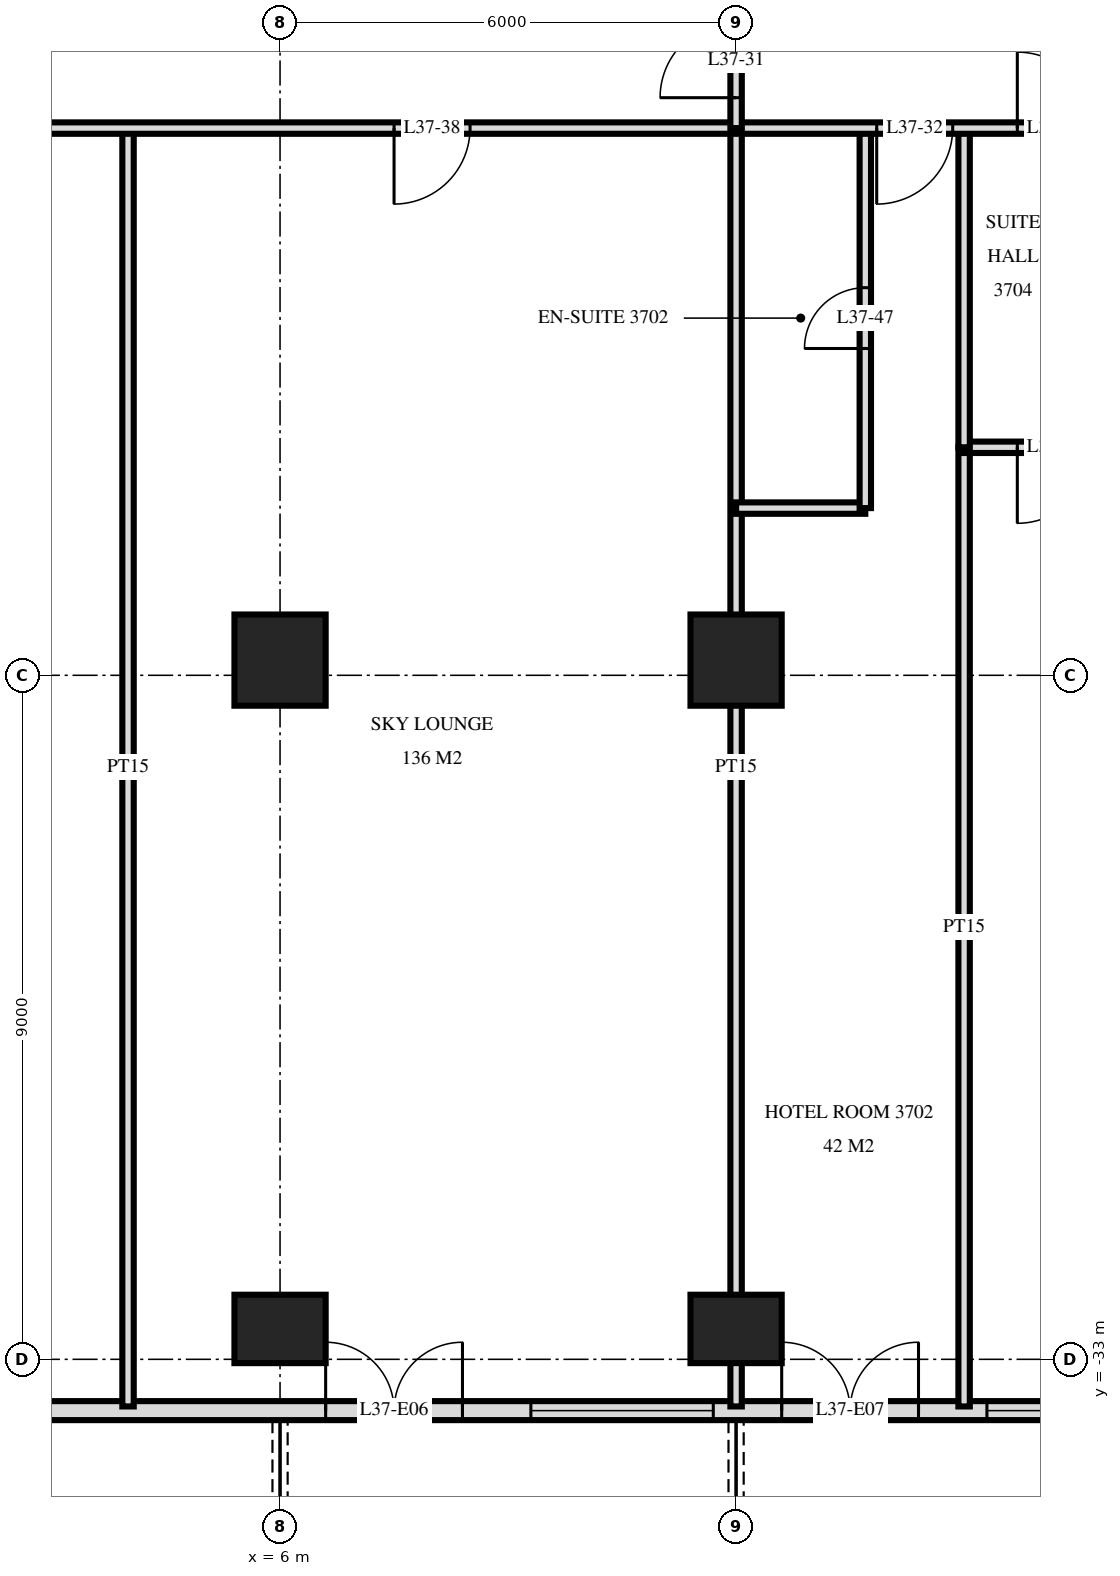
"""IFC4 building model, lengths in metres.
Left out: names, types, materials, properties, quantities, classifications, styles, units other than length and angle.
Written with IfcOpenShell. Run it as: python <this file> out.ifc"""

import sys

from ifc_helpers import new_model, si_unit, direction, frame, frame_2d, origin, origin_2d, place, context, subcontext, project, spatial, rectangle, extrude, element, fill, save


model = new_model("IFC4")
c1 = context("Model", 3, precision=1e-05, world=origin(), true_north=direction((0.0, 1.0)))
c2 = subcontext(c1, "Body", "Model", "MODEL_VIEW")
j1 = project(units=[si_unit("LENGTHUNIT", "METRE"), si_unit("PLANEANGLEUNIT", "RADIAN")], contexts=[c1])
p1 = place(None, origin())
s1 = spatial("IfcSite", under=j1, at=p1, CompositionType="ELEMENT")
p2 = place(p1, origin())
s2 = spatial("IfcBuilding", under=s1, at=p2, CompositionType="ELEMENT")
p3 = place(p2, frame((0.0, 0.0, 145.2)))
s3 = spatial("IfcBuildingStorey", under=s2, at=p3, CompositionType="ELEMENT", Elevation=145.2)
p4 = place(p3, frame((6.0, -32.6, 0.0), z_axis=(0.0, 0.0, 1.0), x_axis=(1.0, 0.0, 0.0)))
e1 = element("IfcColumn", 1, at=p4, inside=s3, PredefinedType="COLUMN", context=c2, shape_type="SweptSolid", body=[
    extrude(rectangle(XDim=1.2, YDim=0.9, at=origin_2d()), origin(), (0.0, 0.0, 1.0), 3.6),
])
p5 = place(p3, frame((6.0, -23.8, 0.0), z_axis=(0.0, 0.0, 1.0), x_axis=(1.0, 0.0, 0.0)))
e2 = element("IfcColumn", 2, at=p5, inside=s3, PredefinedType="COLUMN", context=c2, shape_type="SweptSolid", body=[
    extrude(rectangle(XDim=1.2, YDim=1.2, at=origin_2d()), origin(), (0.0, 0.0, 1.0), 3.6),
])
p6 = place(p3, frame((12.0, -32.6, 0.0), z_axis=(0.0, 0.0, 1.0), x_axis=(1.0, 0.0, 0.0)))
e3 = element("IfcColumn", 3, at=p6, inside=s3, PredefinedType="COLUMN", context=c2, shape_type="SweptSolid", body=[
    extrude(rectangle(XDim=1.2, YDim=0.9, at=origin_2d()), origin(), (0.0, 0.0, 1.0), 3.6),
])
p7 = place(p3, frame((12.0, -23.8, 0.0), z_axis=(0.0, 0.0, 1.0), x_axis=(1.0, 0.0, 0.0)))
e4 = element("IfcColumn", 4, at=p7, inside=s3, PredefinedType="COLUMN", context=c2, shape_type="SweptSolid", body=[
    extrude(rectangle(XDim=1.2, YDim=1.2, at=origin_2d()), origin(), (0.0, 0.0, 1.0), 3.6),
])
p8 = place(p3, frame((-23.675, -33.675, 0.0), z_axis=(0.0, 0.0, 1.0), x_axis=(1.0, 0.0, 0.0)))
e5 = element("IfcWall", 5, at=p8, inside=s3, PredefinedType="SOLIDWALL", context=c2, shape_type="SweptSolid", body=[
    extrude(rectangle(XDim=47.351, YDim=0.25, at=frame_2d((23.675, 0.0))), origin(), (0.0, 0.0, 1.0), 3.32),
])
p9 = place(p8, frame((3.425, 0.0, 0.0)))
e6 = element("IfcOpeningElement", 6, at=p9, cuts=e5, PredefinedType="OPENING", context=c2, shape_type="SweptSolid", body=[
    extrude(rectangle(XDim=1.8, YDim=2.4, at=frame_2d((0.9, 1.2))), frame((0.0, 0.135, 0.0), z_axis=(0.0, -1.0, 0.0), x_axis=(1.0, 0.0, 0.0)), (0.0, 0.0, 1.0), 0.27),
])
p10 = place(p8, frame((6.275, 0.0, 0.0)))
e7 = element("IfcOpeningElement", 7, at=p10, cuts=e5, PredefinedType="OPENING", context=c2, shape_type="SweptSolid", body=[
    extrude(rectangle(XDim=1.8, YDim=2.4, at=frame_2d((0.9, 1.2))), frame((0.0, 0.135, 0.0), z_axis=(0.0, -1.0, 0.0), x_axis=(1.0, 0.0, 0.0)), (0.0, 0.0, 1.0), 0.27),
])
p11 = place(p8, frame((8.975, 0.0, 0.3)))
e8 = element("IfcOpeningElement", 8, at=p11, cuts=e5, PredefinedType="OPENING", context=c2, shape_type="SweptSolid", body=[
    extrude(rectangle(XDim=2.4, YDim=2.1, at=frame_2d((1.2, 1.05))), frame((0.0, 0.135, 0.0), z_axis=(0.0, -1.0, 0.0), x_axis=(1.0, 0.0, 0.0)), (0.0, 0.0, 1.0), 0.27),
])
p12 = place(p8, frame((12.275, 0.0, 0.0)))
e9 = element("IfcOpeningElement", 9, at=p12, cuts=e5, PredefinedType="OPENING", context=c2, shape_type="SweptSolid", body=[
    extrude(rectangle(XDim=1.8, YDim=2.4, at=frame_2d((0.9, 1.2))), frame((0.0, 0.135, 0.0), z_axis=(0.0, -1.0, 0.0), x_axis=(1.0, 0.0, 0.0)), (0.0, 0.0, 1.0), 0.27),
])
p13 = place(p8, frame((14.975, 0.0, 0.3)))
e10 = element("IfcOpeningElement", 10, at=p13, cuts=e5, PredefinedType="OPENING", context=c2, shape_type="SweptSolid", body=[
    extrude(rectangle(XDim=2.4, YDim=2.1, at=frame_2d((1.2, 1.05))), frame((0.0, 0.135, 0.0), z_axis=(0.0, -1.0, 0.0), x_axis=(1.0, 0.0, 0.0)), (0.0, 0.0, 1.0), 0.27),
])
p14 = place(p8, frame((21.275, 0.0, 0.0)))
e11 = element("IfcOpeningElement", 11, at=p14, cuts=e5, PredefinedType="OPENING", context=c2, shape_type="SweptSolid", body=[
    extrude(rectangle(XDim=1.8, YDim=2.4, at=frame_2d((0.9, 1.2))), frame((0.0, 0.135, 0.0), z_axis=(0.0, -1.0, 0.0), x_axis=(1.0, 0.0, 0.0)), (0.0, 0.0, 1.0), 0.27),
])
p15 = place(p8, frame((24.275, 0.0, 0.0)))
e12 = element("IfcOpeningElement", 12, at=p15, cuts=e5, PredefinedType="OPENING", context=c2, shape_type="SweptSolid", body=[
    extrude(rectangle(XDim=1.8, YDim=2.4, at=frame_2d((0.9, 1.2))), frame((0.0, 0.135, 0.0), z_axis=(0.0, -1.0, 0.0), x_axis=(1.0, 0.0, 0.0)), (0.0, 0.0, 1.0), 0.27),
])
p16 = place(p8, frame((30.275, 0.0, 0.0)))
e13 = element("IfcOpeningElement", 13, at=p16, cuts=e5, PredefinedType="OPENING", context=c2, shape_type="SweptSolid", body=[
    extrude(rectangle(XDim=1.8, YDim=2.4, at=frame_2d((0.9, 1.2))), frame((0.0, 0.135, 0.0), z_axis=(0.0, -1.0, 0.0), x_axis=(1.0, 0.0, 0.0)), (0.0, 0.0, 1.0), 0.27),
])
p17 = place(p8, frame((32.975, 0.0, 0.3)))
e14 = element("IfcOpeningElement", 14, at=p17, cuts=e5, PredefinedType="OPENING", context=c2, shape_type="SweptSolid", body=[
    extrude(rectangle(XDim=2.4, YDim=2.1, at=frame_2d((1.2, 1.05))), frame((0.0, 0.135, 0.0), z_axis=(0.0, -1.0, 0.0), x_axis=(1.0, 0.0, 0.0)), (0.0, 0.0, 1.0), 0.27),
])
p18 = place(p8, frame((36.275, 0.0, 0.0)))
e15 = element("IfcOpeningElement", 15, at=p18, cuts=e5, PredefinedType="OPENING", context=c2, shape_type="SweptSolid", body=[
    extrude(rectangle(XDim=1.8, YDim=2.4, at=frame_2d((0.9, 1.2))), frame((0.0, 0.135, 0.0), z_axis=(0.0, -1.0, 0.0), x_axis=(1.0, 0.0, 0.0)), (0.0, 0.0, 1.0), 0.27),
])
p19 = place(p8, frame((38.975, 0.0, 0.3)))
e16 = element("IfcOpeningElement", 16, at=p19, cuts=e5, PredefinedType="OPENING", context=c2, shape_type="SweptSolid", body=[
    extrude(rectangle(XDim=2.4, YDim=2.1, at=frame_2d((1.2, 1.05))), frame((0.0, 0.135, 0.0), z_axis=(0.0, -1.0, 0.0), x_axis=(1.0, 0.0, 0.0)), (0.0, 0.0, 1.0), 0.27),
])
p20 = place(p8, frame((42.275, 0.0, 0.0)))
e17 = element("IfcOpeningElement", 17, at=p20, cuts=e5, PredefinedType="OPENING", context=c2, shape_type="SweptSolid", body=[
    extrude(rectangle(XDim=1.8, YDim=2.4, at=frame_2d((0.9, 1.2))), frame((0.0, 0.135, 0.0), z_axis=(0.0, -1.0, 0.0), x_axis=(1.0, 0.0, 0.0)), (0.0, 0.0, 1.0), 0.27),
])
p21 = place(p8, frame((45.125, 0.0, 0.3)))
e18 = element("IfcOpeningElement", 18, at=p21, cuts=e5, PredefinedType="OPENING", context=c2, shape_type="SweptSolid", body=[
    extrude(rectangle(XDim=1.8, YDim=2.1, at=frame_2d((0.9, 1.05))), frame((0.0, 0.135, 0.0), z_axis=(0.0, -1.0, 0.0), x_axis=(1.0, 0.0, 0.0)), (0.0, 0.0, 1.0), 0.27),
])
p22 = place(p3, frame((15.0, -21.0, 0.0), z_axis=(0.0, 0.0, 1.0), x_axis=(0.0, 1.0, 0.0)))
e19 = element("IfcWall", 19, at=p22, inside=s3, PredefinedType="PARTITIONING", context=c2, shape_type="SweptSolid", body=[
    extrude(rectangle(XDim=4.2, YDim=0.15, at=frame_2d((2.1, 0.0))), origin(), (0.0, 0.0, 1.0), 3.32),
])
p23 = place(p3, frame((15.0, -33.62, 0.0), z_axis=(0.0, 0.0, 1.0), x_axis=(0.0, 1.0, 0.0)))
e20 = element("IfcWall", 20, at=p23, inside=s3, PredefinedType="PARTITIONING", context=c2, shape_type="SweptSolid", body=[
    extrude(rectangle(XDim=12.62, YDim=0.15, at=frame_2d((6.31, 0.0))), origin(), (0.0, 0.0, 1.0), 3.32),
])
p24 = place(p3, frame((13.7, -21.8, 0.0), z_axis=(0.0, 0.0, 1.0), x_axis=(0.0, 1.0, 0.0)))
e21 = element("IfcWall", 21, at=p24, inside=s3, PredefinedType="PARTITIONING", context=c2, shape_type="SweptSolid", body=[
    extrude(rectangle(XDim=5.0, YDim=0.15, at=frame_2d((2.5, 0.0))), origin(), (0.0, 0.0, 1.0), 3.32),
])
p25 = place(p24, frame((2.1, 0.0, 0.0)))
e22 = element("IfcOpeningElement", 22, at=p25, cuts=e21, PredefinedType="OPENING", context=c2, shape_type="SweptSolid", body=[
    extrude(rectangle(XDim=0.8, YDim=2.1, at=frame_2d((0.4, 1.05))), frame((0.0, 0.085, 0.0), z_axis=(0.0, -1.0, 0.0), x_axis=(1.0, 0.0, 0.0)), (0.0, 0.0, 1.0), 0.17),
])
p26 = place(p3, frame((12.0, -16.8, 0.0), z_axis=(0.0, 0.0, 1.0), x_axis=(0.0, 1.0, 0.0)))
e23 = element("IfcWall", 23, at=p26, inside=s3, PredefinedType="PARTITIONING", context=c2, shape_type="SweptSolid", body=[
    extrude(rectangle(XDim=1.75, YDim=0.15, at=frame_2d((0.875, 0.0))), origin(), (0.0, 0.0, 1.0), 3.32),
])
p27 = place(p26, frame((0.4, 0.0, 0.0)))
e24 = element("IfcOpeningElement", 24, at=p27, cuts=e23, PredefinedType="OPENING", context=c2, shape_type="SweptSolid", body=[
    extrude(rectangle(XDim=1.0, YDim=2.1, at=frame_2d((0.5, 1.05))), frame((0.0, 0.085, 0.0), z_axis=(0.0, -1.0, 0.0), x_axis=(1.0, 0.0, 0.0)), (0.0, 0.0, 1.0), 0.17),
])
for number, where, z_axis, x_axis in (
    (25, (12.0, -33.62, 0.0), (0.0, 0.0, 1.0), (0.0, 1.0, 0.0)),
    (26, (4.0, -33.62, 0.0), (0.0, 0.0, 1.0), (0.0, 1.0, 0.0)),
):
    element("IfcWall", number, at=place(p3, frame(where, z_axis=z_axis, x_axis=x_axis)), inside=s3, PredefinedType="PARTITIONING", context=c2, shape_type="SweptSolid", body=[
        extrude(rectangle(XDim=16.82, YDim=0.15, at=frame_2d((8.41, 0.0))), origin(), (0.0, 0.0, 1.0), 3.32),
    ])
p28 = place(p3, frame((12.0, -21.8, 0.0), z_axis=(0.0, 0.0, 1.0), x_axis=(1.0, 0.0, 0.0)))
e27 = element("IfcWall", 27, at=p28, inside=s3, PredefinedType="PARTITIONING", context=c2, shape_type="SweptSolid", body=[
    extrude(rectangle(XDim=1.7, YDim=0.15, at=frame_2d((0.85, 0.0))), origin(), (0.0, 0.0, 1.0), 3.32),
])
p29 = place(p3, frame((15.0, -21.0, 0.0), z_axis=(0.0, 0.0, 1.0), x_axis=(1.0, 0.0, 0.0)))
e28 = element("IfcWall", 28, at=p29, inside=s3, PredefinedType="PARTITIONING", context=c2, shape_type="SweptSolid", body=[
    extrude(rectangle(XDim=2.4, YDim=0.15, at=frame_2d((1.2, 0.0))), origin(), (0.0, 0.0, 1.0), 3.32),
])
p30 = place(p29, frame((0.7, 0.0, 0.0)))
e29 = element("IfcOpeningElement", 29, at=p30, cuts=e28, PredefinedType="OPENING", context=c2, shape_type="SweptSolid", body=[
    extrude(rectangle(XDim=1.0, YDim=2.1, at=frame_2d((0.5, 1.05))), frame((0.0, 0.085, 0.0), z_axis=(0.0, -1.0, 0.0), x_axis=(1.0, 0.0, 0.0)), (0.0, 0.0, 1.0), 0.17),
])
p31 = place(p3, frame((-28.02, -16.8, 0.0), z_axis=(0.0, 0.0, 1.0), x_axis=(1.0, 0.0, 0.0)))
e30 = element("IfcWall", 30, at=p31, inside=s3, PredefinedType="PARTITIONING", context=c2, shape_type="SweptSolid", body=[
    extrude(rectangle(XDim=56.04, YDim=0.15, at=frame_2d((28.02, 0.0))), origin(), (0.0, 0.0, 1.0), 3.32),
])
p32 = place(p31, frame((13.17, 0.0, 0.0)))
e31 = element("IfcOpeningElement", 31, at=p32, cuts=e30, PredefinedType="OPENING", context=c2, shape_type="SweptSolid", body=[
    extrude(rectangle(XDim=1.0, YDim=2.1, at=frame_2d((0.5, 1.05))), frame((0.0, 0.085, 0.0), z_axis=(0.0, -1.0, 0.0), x_axis=(1.0, 0.0, 0.0)), (0.0, 0.0, 1.0), 0.17),
])
p33 = place(p31, frame((11.32, 0.0, 0.0)))
e32 = element("IfcOpeningElement", 32, at=p33, cuts=e30, PredefinedType="OPENING", context=c2, shape_type="SweptSolid", body=[
    extrude(rectangle(XDim=1.0, YDim=2.1, at=frame_2d((0.5, 1.05))), frame((0.0, 0.085, 0.0), z_axis=(0.0, -1.0, 0.0), x_axis=(1.0, 0.0, 0.0)), (0.0, 0.0, 1.0), 0.17),
])
p34 = place(p31, frame((41.87, 0.0, 0.0)))
e33 = element("IfcOpeningElement", 33, at=p34, cuts=e30, PredefinedType="OPENING", context=c2, shape_type="SweptSolid", body=[
    extrude(rectangle(XDim=1.0, YDim=2.1, at=frame_2d((0.5, 1.05))), frame((0.0, 0.085, 0.0), z_axis=(0.0, -1.0, 0.0), x_axis=(1.0, 0.0, 0.0)), (0.0, 0.0, 1.0), 0.17),
])
p35 = place(p31, frame((43.72, 0.0, 0.0)))
e34 = element("IfcOpeningElement", 34, at=p35, cuts=e30, PredefinedType="OPENING", context=c2, shape_type="SweptSolid", body=[
    extrude(rectangle(XDim=1.0, YDim=2.1, at=frame_2d((0.5, 1.05))), frame((0.0, 0.085, 0.0), z_axis=(0.0, -1.0, 0.0), x_axis=(1.0, 0.0, 0.0)), (0.0, 0.0, 1.0), 0.17),
])
p36 = place(p31, frame((19.52, 0.0, 0.0)))
e35 = element("IfcOpeningElement", 35, at=p36, cuts=e30, PredefinedType="OPENING", context=c2, shape_type="SweptSolid", body=[
    extrude(rectangle(XDim=1.0, YDim=2.1, at=frame_2d((0.5, 1.05))), frame((0.0, 0.085, 0.0), z_axis=(0.0, -1.0, 0.0), x_axis=(1.0, 0.0, 0.0)), (0.0, 0.0, 1.0), 0.17),
])
p37 = place(p31, frame((27.52, 0.0, 0.0)))
e36 = element("IfcOpeningElement", 36, at=p37, cuts=e30, PredefinedType="OPENING", context=c2, shape_type="SweptSolid", body=[
    extrude(rectangle(XDim=1.0, YDim=2.1, at=frame_2d((0.5, 1.05))), frame((0.0, 0.085, 0.0), z_axis=(0.0, -1.0, 0.0), x_axis=(1.0, 0.0, 0.0)), (0.0, 0.0, 1.0), 0.17),
])
p38 = place(p31, frame((35.52, 0.0, 0.0)))
e37 = element("IfcOpeningElement", 37, at=p38, cuts=e30, PredefinedType="OPENING", context=c2, shape_type="SweptSolid", body=[
    extrude(rectangle(XDim=1.0, YDim=2.1, at=frame_2d((0.5, 1.05))), frame((0.0, 0.085, 0.0), z_axis=(0.0, -1.0, 0.0), x_axis=(1.0, 0.0, 0.0)), (0.0, 0.0, 1.0), 0.17),
])
p39 = place(p16, origin())
e38 = element("IfcDoor", 38, at=p39, inside=s3, OperationType="DOUBLE_DOOR_SINGLE_SWING", PredefinedType="DOOR", context=c2, shape_type="SweptSolid", body=[
    extrude(rectangle(XDim=1.8, YDim=2.4, at=frame_2d((0.9, 1.2))), frame((0.0, 0.025, 0.0), z_axis=(0.0, -1.0, 0.0), x_axis=(1.0, 0.0, 0.0)), (0.0, 0.0, 1.0), 0.05),
])
fill(e13, e38)
p40 = place(p17, origin())
e39 = element("IfcWindow", 39, at=p40, inside=s3, PartitioningType="SINGLE_PANEL", PredefinedType="WINDOW", context=c2, shape_type="SweptSolid", body=[
    extrude(rectangle(XDim=2.4, YDim=2.1, at=frame_2d((1.2, 1.05))), frame((0.0, 0.03, 0.0), z_axis=(0.0, -1.0, 0.0), x_axis=(1.0, 0.0, 0.0)), (0.0, 0.0, 1.0), 0.06),
])
fill(e14, e39)
p41 = place(p18, origin())
e40 = element("IfcDoor", 40, at=p41, inside=s3, OperationType="DOUBLE_DOOR_SINGLE_SWING", PredefinedType="DOOR", context=c2, shape_type="SweptSolid", body=[
    extrude(rectangle(XDim=1.8, YDim=2.4, at=frame_2d((0.9, 1.2))), frame((0.0, 0.025, 0.0), z_axis=(0.0, -1.0, 0.0), x_axis=(1.0, 0.0, 0.0)), (0.0, 0.0, 1.0), 0.05),
])
fill(e15, e40)
p42 = place(p19, origin())
e41 = element("IfcWindow", 41, at=p42, inside=s3, PartitioningType="SINGLE_PANEL", PredefinedType="WINDOW", context=c2, shape_type="SweptSolid", body=[
    extrude(rectangle(XDim=2.4, YDim=2.1, at=frame_2d((1.2, 1.05))), frame((0.0, 0.03, 0.0), z_axis=(0.0, -1.0, 0.0), x_axis=(1.0, 0.0, 0.0)), (0.0, 0.0, 1.0), 0.06),
])
fill(e16, e41)
p43 = place(p27, origin())
e42 = element("IfcDoor", 42, at=p43, inside=s3, OperationType="SINGLE_SWING_RIGHT", PredefinedType="DOOR", context=c2, shape_type="SweptSolid", body=[
    extrude(rectangle(XDim=1.0, YDim=2.1, at=frame_2d((0.5, 1.05))), frame((0.0, 0.025, 0.0), z_axis=(0.0, -1.0, 0.0), x_axis=(1.0, 0.0, 0.0)), (0.0, 0.0, 1.0), 0.05),
])
fill(e24, e42)
p44 = place(p34, frame((0.5, 0.0, 0.0), z_axis=(0.0, 0.0, 1.0), x_axis=(-1.0, 0.0, 0.0)))
e43 = element("IfcDoor", 43, at=p44, inside=s3, OperationType="SINGLE_SWING_LEFT", PredefinedType="DOOR", context=c2, shape_type="SweptSolid", body=[
    extrude(rectangle(XDim=1.0, YDim=2.1, at=frame_2d((0.0, 1.05))), frame((0.0, -0.025, 0.0), z_axis=(0.0, 1.0, 0.0), x_axis=(-1.0, 0.0, 0.0)), (0.0, 0.0, 1.0), 0.05),
])
fill(e33, e43)
p45 = place(p35, origin())
e44 = element("IfcDoor", 44, at=p45, inside=s3, OperationType="SINGLE_SWING_RIGHT", PredefinedType="DOOR", context=c2, shape_type="SweptSolid", body=[
    extrude(rectangle(XDim=1.0, YDim=2.1, at=frame_2d((0.5, 1.05))), frame((0.0, 0.025, 0.0), z_axis=(0.0, -1.0, 0.0), x_axis=(1.0, 0.0, 0.0)), (0.0, 0.0, 1.0), 0.05),
])
fill(e34, e44)
p46 = place(p38, frame((0.5, 0.0, 0.0), z_axis=(0.0, 0.0, 1.0), x_axis=(-1.0, 0.0, 0.0)))
e45 = element("IfcDoor", 45, at=p46, inside=s3, OperationType="SINGLE_SWING_LEFT", PredefinedType="DOOR", context=c2, shape_type="SweptSolid", body=[
    extrude(rectangle(XDim=1.0, YDim=2.1, at=frame_2d((0.0, 1.05))), frame((0.0, -0.025, 0.0), z_axis=(0.0, 1.0, 0.0), x_axis=(-1.0, 0.0, 0.0)), (0.0, 0.0, 1.0), 0.05),
])
fill(e37, e45)
p47 = place(p25, origin())
e46 = element("IfcDoor", 46, at=p47, inside=s3, OperationType="SINGLE_SWING_RIGHT", PredefinedType="DOOR", context=c2, shape_type="SweptSolid", body=[
    extrude(rectangle(XDim=0.8, YDim=2.1, at=frame_2d((0.4, 1.05))), frame((0.0, 0.025, 0.0), z_axis=(0.0, -1.0, 0.0), x_axis=(1.0, 0.0, 0.0)), (0.0, 0.0, 1.0), 0.05),
])
fill(e22, e46)
p48 = place(p30, frame((0.5, 0.0, 0.0), z_axis=(0.0, 0.0, 1.0), x_axis=(-1.0, 0.0, 0.0)))
e47 = element("IfcDoor", 47, at=p48, inside=s3, OperationType="SINGLE_SWING_LEFT", PredefinedType="DOOR", context=c2, shape_type="SweptSolid", body=[
    extrude(rectangle(XDim=1.0, YDim=2.1, at=frame_2d((0.0, 1.05))), frame((0.0, -0.025, 0.0), z_axis=(0.0, 1.0, 0.0), x_axis=(-1.0, 0.0, 0.0)), (0.0, 0.0, 1.0), 0.05),
])
fill(e29, e47)
save(model, sys.argv[1])
